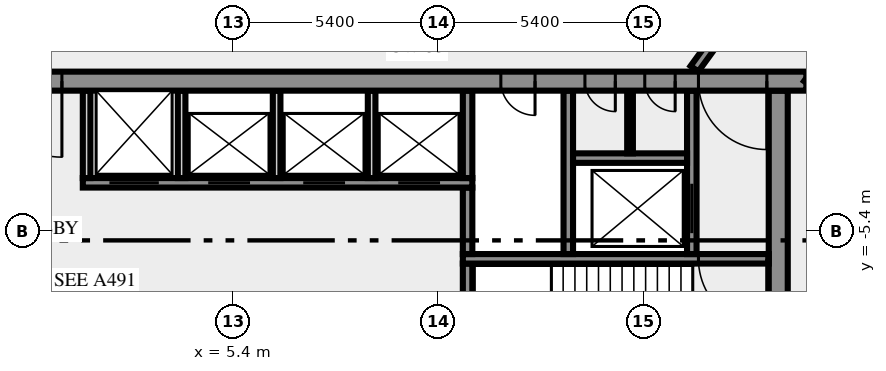
"""IFC4 building model, lengths in metres.
Left out: names, types, materials, properties, quantities, classifications, styles, units other than length and angle.
Written with IfcOpenShell. Run it as: python <this file> out.ifc"""

import sys

from ifc_helpers import new_model, si_unit, direction, frame, frame_2d, origin, place, context, subcontext, project, spatial, rectangle, extrude, element, fill, save


model = new_model("IFC4")
c1 = context("Model", 3, precision=1e-05, world=origin(), true_north=direction((0.0, 1.0)))
c2 = subcontext(c1, "Body", "Model", "MODEL_VIEW")
j1 = project(units=[si_unit("LENGTHUNIT", "METRE"), si_unit("PLANEANGLEUNIT", "RADIAN")], contexts=[c1])
p1 = place(None, origin())
s1 = spatial("IfcSite", under=j1, at=p1, CompositionType="ELEMENT")
p2 = place(p1, origin())
s2 = spatial("IfcBuilding", under=s1, at=p2, CompositionType="ELEMENT")
p3 = place(p2, frame((0.0, 0.0, 198.0)))
s3 = spatial("IfcBuildingStorey", under=s2, at=p3, CompositionType="ELEMENT", Elevation=198.0)
p4 = place(p3, frame((19.75, -10.5, 0.0), z_axis=(0.0, 0.0, 1.0), x_axis=(0.0, 1.0, 0.0)))
e1 = element("IfcWall", 1, at=p4, inside=s3, PredefinedType="SHEAR", context=c2, shape_type="SweptSolid", body=[
    extrude(rectangle(XDim=8.8, YDim=0.5, at=frame_2d((4.4, 0.0))), origin(), (0.0, 0.0, 1.0), 3.65),
])
p5 = place(p3, frame((11.575, -7.25, 0.0), z_axis=(0.0, 0.0, 1.0), x_axis=(0.0, 1.0, 0.0)))
e2 = element("IfcWall", 2, at=p5, inside=s3, PredefinedType="SHEAR", context=c2, shape_type="SweptSolid", body=[
    extrude(rectangle(XDim=1.0, YDim=0.25, at=frame_2d((0.5, 0.0))), origin(), (0.0, 0.0, 1.0), 3.65),
])
p6 = place(p3, frame((19.5, -6.125, 0.0), z_axis=(0.0, 0.0, 1.0), x_axis=(-1.0, 0.0, 0.0)))
e3 = element("IfcWall", 3, at=p6, inside=s3, PredefinedType="SHEAR", context=c2, shape_type="SweptSolid", body=[
    extrude(rectangle(XDim=8.05, YDim=0.25, at=frame_2d((4.025, 0.0))), origin(), (0.0, 0.0, 1.0), 3.65),
])
p7 = place(p6, frame((0.05, 0.0, 0.0)))
e4 = element("IfcOpeningElement", 4, at=p7, cuts=e3, PredefinedType="OPENING", context=c2, shape_type="SweptSolid", body=[
    extrude(rectangle(XDim=1.8, YDim=2.1, at=frame_2d((0.9, 1.05))), frame((0.0, 0.135, 0.0), z_axis=(0.0, -1.0, 0.0), x_axis=(1.0, 0.0, 0.0)), (0.0, 0.0, 1.0), 0.27),
])
p8 = place(p3, frame((11.575, -6.0, 0.0), z_axis=(0.0, 0.0, 1.0), x_axis=(0.0, 1.0, 0.0)))
e5 = element("IfcWall", 5, at=p8, inside=s3, PredefinedType="SHEAR", context=c2, shape_type="SweptSolid", body=[
    extrude(rectangle(XDim=1.75, YDim=0.25, at=frame_2d((0.875, 0.0))), origin(), (0.0, 0.0, 1.0), 3.65),
])
p9 = place(p3, frame((14.225, -6.0, 0.0), z_axis=(0.0, 0.0, 1.0), x_axis=(0.0, 1.0, 0.0)))
e6 = element("IfcWall", 6, at=p9, inside=s3, PredefinedType="SHEAR", context=c2, shape_type="SweptSolid", body=[
    extrude(rectangle(XDim=4.3, YDim=0.25, at=frame_2d((2.15, 0.0))), origin(), (0.0, 0.0, 1.0), 3.65),
])
p10 = place(p3, frame((17.475, -6.0, 0.0), z_axis=(0.0, 0.0, 1.0), x_axis=(0.0, 1.0, 0.0)))
e7 = element("IfcWall", 7, at=p10, inside=s3, PredefinedType="SHEAR", context=c2, shape_type="SweptSolid", body=[
    extrude(rectangle(XDim=4.3, YDim=0.25, at=frame_2d((2.15, 0.0))), origin(), (0.0, 0.0, 1.0), 3.65),
])
p11 = place(p10, frame((0.55, 0.0, 0.0)))
e8 = element("IfcOpeningElement", 8, at=p11, cuts=e7, PredefinedType="OPENING", context=c2, shape_type="SweptSolid", body=[
    extrude(rectangle(XDim=1.3, YDim=2.1, at=frame_2d((0.65, 1.05))), frame((0.0, 0.135, 0.0), z_axis=(0.0, -1.0, 0.0), x_axis=(1.0, 0.0, 0.0)), (0.0, 0.0, 1.0), 0.27),
])
p12 = place(p3, frame((1.45, -4.125, 0.0), z_axis=(0.0, 0.0, 1.0), x_axis=(1.0, 0.0, 0.0)))
e9 = element("IfcWall", 9, at=p12, inside=s3, PredefinedType="SHEAR", context=c2, shape_type="SweptSolid", body=[
    extrude(rectangle(XDim=10.25, YDim=0.25, at=frame_2d((5.125, 0.0))), origin(), (0.0, 0.0, 1.0), 3.65),
])
p13 = place(p12, frame((0.7, 0.0, 0.0)))
e10 = element("IfcOpeningElement", 10, at=p13, cuts=e9, PredefinedType="OPENING", context=c2, shape_type="SweptSolid", body=[
    extrude(rectangle(XDim=1.3, YDim=2.1, at=frame_2d((0.65, 1.05))), frame((0.0, 0.135, 0.0), z_axis=(0.0, -1.0, 0.0), x_axis=(1.0, 0.0, 0.0)), (0.0, 0.0, 1.0), 0.27),
])
p14 = place(p12, frame((3.3, 0.0, 0.0)))
e11 = element("IfcOpeningElement", 11, at=p14, cuts=e9, PredefinedType="OPENING", context=c2, shape_type="SweptSolid", body=[
    extrude(rectangle(XDim=1.1, YDim=2.1, at=frame_2d((0.55, 1.05))), frame((0.0, 0.135, 0.0), z_axis=(0.0, -1.0, 0.0), x_axis=(1.0, 0.0, 0.0)), (0.0, 0.0, 1.0), 0.27),
])
p15 = place(p12, frame((5.8, 0.0, 0.0)))
e12 = element("IfcOpeningElement", 12, at=p15, cuts=e9, PredefinedType="OPENING", context=c2, shape_type="SweptSolid", body=[
    extrude(rectangle(XDim=1.1, YDim=2.1, at=frame_2d((0.55, 1.05))), frame((0.0, 0.135, 0.0), z_axis=(0.0, -1.0, 0.0), x_axis=(1.0, 0.0, 0.0)), (0.0, 0.0, 1.0), 0.27),
])
p16 = place(p12, frame((8.3, 0.0, 0.0)))
e13 = element("IfcOpeningElement", 13, at=p16, cuts=e9, PredefinedType="OPENING", context=c2, shape_type="SweptSolid", body=[
    extrude(rectangle(XDim=1.1, YDim=2.1, at=frame_2d((0.55, 1.05))), frame((0.0, 0.135, 0.0), z_axis=(0.0, -1.0, 0.0), x_axis=(1.0, 0.0, 0.0)), (0.0, 0.0, 1.0), 0.27),
])
for number, where, z_axis, x_axis in (
    (14, (1.55, -4.0, 0.0), (0.0, 0.0, 1.0), (0.0, 1.0, 0.0)),
    (15, (4.05, -4.0, 0.0), (0.0, 0.0, 1.0), (0.0, 1.0, 0.0)),
    (16, (6.55, -4.0, 0.0), (0.0, 0.0, 1.0), (0.0, 1.0, 0.0)),
    (17, (9.05, -4.0, 0.0), (0.0, 0.0, 1.0), (0.0, 1.0, 0.0)),
):
    element("IfcWall", number, at=place(p3, frame(where, z_axis=z_axis, x_axis=x_axis)), inside=s3, PredefinedType="SOLIDWALL", context=c2, shape_type="SweptSolid", body=[
        extrude(rectangle(XDim=2.3, YDim=0.2, at=frame_2d((1.15, 0.0))), origin(), (0.0, 0.0, 1.0), 3.65),
    ])
p17 = place(p3, frame((11.575, -4.0, 0.0), z_axis=(0.0, 0.0, 1.0), x_axis=(0.0, 1.0, 0.0)))
e18 = element("IfcWall", 18, at=p17, inside=s3, PredefinedType="SHEAR", context=c2, shape_type="SweptSolid", body=[
    extrude(rectangle(XDim=2.3, YDim=0.25, at=frame_2d((1.15, 0.0))), origin(), (0.0, 0.0, 1.0), 3.65),
])
p18 = place(p3, frame((14.35, -3.475, 0.0), z_axis=(0.0, 0.0, 1.0), x_axis=(1.0, 0.0, 0.0)))
e19 = element("IfcWall", 19, at=p18, inside=s3, PredefinedType="SHEAR", context=c2, shape_type="SweptSolid", body=[
    extrude(rectangle(XDim=3.0, YDim=0.25, at=frame_2d((1.5, 0.0))), origin(), (0.0, 0.0, 1.0), 3.65),
])
p19 = place(p3, frame((15.85, -3.35, 0.0), z_axis=(0.0, 0.0, 1.0), x_axis=(0.0, 1.0, 0.0)))
e20 = element("IfcWall", 20, at=p19, inside=s3, PredefinedType="PARTITIONING", context=c2, shape_type="SweptSolid", body=[
    extrude(rectangle(XDim=1.65, YDim=0.15, at=frame_2d((0.825, 0.0))), origin(), (0.0, 0.0, 1.0), 3.65),
])
p20 = place(p3, frame((20.49, -1.45, 0.0), z_axis=(0.0, 0.0, 1.0), x_axis=(-1.0, 0.0, 0.0)))
e21 = element("IfcWall", 21, at=p20, inside=s3, PredefinedType="SHEAR", context=c2, shape_type="SweptSolid", body=[
    extrude(rectangle(XDim=40.98, YDim=0.5, at=frame_2d((20.49, 0.0))), origin(), (0.0, 0.0, 1.0), 3.65),
])
p21 = place(p20, frame((38.14, 0.0, 0.0)))
e22 = element("IfcOpeningElement", 22, at=p21, cuts=e21, PredefinedType="OPENING", context=c2, shape_type="SweptSolid", body=[
    extrude(rectangle(XDim=1.8, YDim=2.1, at=frame_2d((0.9, 1.05))), frame((0.0, 0.26, 0.0), z_axis=(0.0, -1.0, 0.0), x_axis=(1.0, 0.0, 0.0)), (0.0, 0.0, 1.0), 0.52),
])
p22 = place(p20, frame((35.89, 0.0, 0.0)))
e23 = element("IfcOpeningElement", 23, at=p22, cuts=e21, PredefinedType="OPENING", context=c2, shape_type="SweptSolid", body=[
    extrude(rectangle(XDim=0.9, YDim=2.1, at=frame_2d((0.45, 1.05))), frame((0.0, 0.26, 0.0), z_axis=(0.0, -1.0, 0.0), x_axis=(1.0, 0.0, 0.0)), (0.0, 0.0, 1.0), 0.52),
])
p23 = place(p20, frame((32.94, 0.0, 0.0)))
e24 = element("IfcOpeningElement", 24, at=p23, cuts=e21, PredefinedType="OPENING", context=c2, shape_type="SweptSolid", body=[
    extrude(rectangle(XDim=0.9, YDim=2.1, at=frame_2d((0.45, 1.05))), frame((0.0, 0.26, 0.0), z_axis=(0.0, -1.0, 0.0), x_axis=(1.0, 0.0, 0.0)), (0.0, 0.0, 1.0), 0.52),
])
p24 = place(p20, frame((30.302, 0.0, 0.0)))
e25 = element("IfcOpeningElement", 25, at=p24, cuts=e21, PredefinedType="OPENING", context=c2, shape_type="SweptSolid", body=[
    extrude(rectangle(XDim=0.9, YDim=2.1, at=frame_2d((0.45, 1.05))), frame((0.0, 0.26, 0.0), z_axis=(0.0, -1.0, 0.0), x_axis=(1.0, 0.0, 0.0)), (0.0, 0.0, 1.0), 0.52),
])
p25 = place(p20, frame((26.577, 0.0, 0.0)))
e26 = element("IfcOpeningElement", 26, at=p25, cuts=e21, PredefinedType="OPENING", context=c2, shape_type="SweptSolid", body=[
    extrude(rectangle(XDim=0.9, YDim=2.1, at=frame_2d((0.45, 1.05))), frame((0.0, 0.26, 0.0), z_axis=(0.0, -1.0, 0.0), x_axis=(1.0, 0.0, 0.0)), (0.0, 0.0, 1.0), 0.52),
])
p26 = place(p20, frame((19.59, 0.0, 0.0)))
e27 = element("IfcOpeningElement", 27, at=p26, cuts=e21, PredefinedType="OPENING", context=c2, shape_type="SweptSolid", body=[
    extrude(rectangle(XDim=2.0, YDim=2.1, at=frame_2d((1.0, 1.05))), frame((0.0, 0.26, 0.0), z_axis=(0.0, -1.0, 0.0), x_axis=(1.0, 0.0, 0.0)), (0.0, 0.0, 1.0), 0.52),
])
p27 = place(p20, frame((7.14, 0.0, 0.0)))
e28 = element("IfcOpeningElement", 28, at=p27, cuts=e21, PredefinedType="OPENING", context=c2, shape_type="SweptSolid", body=[
    extrude(rectangle(XDim=0.9, YDim=2.1, at=frame_2d((0.45, 1.05))), frame((0.0, 0.26, 0.0), z_axis=(0.0, -1.0, 0.0), x_axis=(1.0, 0.0, 0.0)), (0.0, 0.0, 1.0), 0.52),
])
p28 = place(p20, frame((5.028, 0.0, 0.0)))
e29 = element("IfcOpeningElement", 29, at=p28, cuts=e21, PredefinedType="OPENING", context=c2, shape_type="SweptSolid", body=[
    extrude(rectangle(XDim=0.8, YDim=2.1, at=frame_2d((0.4, 1.05))), frame((0.0, 0.26, 0.0), z_axis=(0.0, -1.0, 0.0), x_axis=(1.0, 0.0, 0.0)), (0.0, 0.0, 1.0), 0.52),
])
p29 = place(p20, frame((3.452, 0.0, 0.0)))
e30 = element("IfcOpeningElement", 30, at=p29, cuts=e21, PredefinedType="OPENING", context=c2, shape_type="SweptSolid", body=[
    extrude(rectangle(XDim=0.8, YDim=2.1, at=frame_2d((0.4, 1.05))), frame((0.0, 0.26, 0.0), z_axis=(0.0, -1.0, 0.0), x_axis=(1.0, 0.0, 0.0)), (0.0, 0.0, 1.0), 0.52),
])
p30 = place(p20, frame((1.04, 0.0, 0.0)))
e31 = element("IfcOpeningElement", 31, at=p30, cuts=e21, PredefinedType="OPENING", context=c2, shape_type="SweptSolid", body=[
    extrude(rectangle(XDim=1.8, YDim=2.1, at=frame_2d((0.9, 1.05))), frame((0.0, 0.26, 0.0), z_axis=(0.0, -1.0, 0.0), x_axis=(1.0, 0.0, 0.0)), (0.0, 0.0, 1.0), 0.52),
])
p31 = place(p3, frame((17.545, -1.125, 0.0), z_axis=(0.0, 0.0, 1.0), x_axis=(0.587796810203, 0.809008596935, 0.0)))
e32 = element("IfcWall", 32, at=p31, inside=s3, PredefinedType="SOLIDWALL", context=c2, shape_type="SweptSolid", body=[
    extrude(rectangle(XDim=12.703, YDim=0.25, at=frame_2d((6.352, 0.0))), origin(), (0.0, 0.0, 1.0), 3.65),
])
p32 = place(p31, frame((3.441, 0.0, 0.0)))
e33 = element("IfcOpeningElement", 33, at=p32, cuts=e32, PredefinedType="OPENING", context=c2, shape_type="SweptSolid", body=[
    extrude(rectangle(XDim=0.9, YDim=2.1, at=frame_2d((0.45, 1.05))), frame((0.0, 0.135, 0.0), z_axis=(0.0, -1.0, 0.0), x_axis=(1.0, 0.0, 0.0)), (0.0, 0.0, 1.0), 0.27),
])
p33 = place(p3, frame((27.009, 7.392, 0.0), z_axis=(0.0, 0.0, 1.0), x_axis=(-0.587776457057, -0.809023384414, 0.0)))
e34 = element("IfcWall", 34, at=p33, inside=s3, PredefinedType="SOLIDWALL", context=c2, shape_type="SweptSolid", body=[
    extrude(rectangle(XDim=11.021, YDim=0.25, at=frame_2d((5.51, 0.0))), origin(), (0.0, 0.0, 1.0), 3.65),
])
p34 = place(p33, frame((9.588, 0.0, 0.0)))
e35 = element("IfcOpeningElement", 35, at=p34, cuts=e34, PredefinedType="OPENING", context=c2, shape_type="SweptSolid", body=[
    extrude(rectangle(XDim=0.9, YDim=2.1, at=frame_2d((0.45, 1.05))), frame((0.0, 0.135, 0.0), z_axis=(0.0, -1.0, 0.0), x_axis=(1.0, 0.0, 0.0)), (0.0, 0.0, 1.0), 0.27),
])
p35 = place(p7, origin())
e36 = element("IfcDoor", 36, at=p35, inside=s3, OperationType="DOUBLE_DOOR_SINGLE_SWING", PredefinedType="DOOR", context=c2, shape_type="SweptSolid", body=[
    extrude(rectangle(XDim=1.8, YDim=2.1, at=frame_2d((0.9, 1.05))), frame((0.0, 0.025, 0.0), z_axis=(0.0, -1.0, 0.0), x_axis=(1.0, 0.0, 0.0)), (0.0, 0.0, 1.0), 0.05),
])
fill(e4, e36)
p36 = place(p11, origin())
e37 = element("IfcDoor", 37, at=p36, inside=s3, OperationType="DOUBLE_DOOR_SLIDING", PredefinedType="DOOR", context=c2, shape_type="SweptSolid", body=[
    extrude(rectangle(XDim=1.3, YDim=2.1, at=frame_2d((0.65, 1.05))), frame((0.0, 0.025, 0.0), z_axis=(0.0, -1.0, 0.0), x_axis=(1.0, 0.0, 0.0)), (0.0, 0.0, 1.0), 0.05),
])
fill(e8, e37)
p37 = place(p13, origin())
e38 = element("IfcDoor", 38, at=p37, inside=s3, OperationType="DOUBLE_DOOR_SLIDING", PredefinedType="DOOR", context=c2, shape_type="SweptSolid", body=[
    extrude(rectangle(XDim=1.3, YDim=2.1, at=frame_2d((0.65, 1.05))), frame((0.0, 0.025, 0.0), z_axis=(0.0, -1.0, 0.0), x_axis=(1.0, 0.0, 0.0)), (0.0, 0.0, 1.0), 0.05),
])
fill(e10, e38)
p38 = place(p14, origin())
e39 = element("IfcDoor", 39, at=p38, inside=s3, OperationType="DOUBLE_DOOR_SLIDING", PredefinedType="DOOR", context=c2, shape_type="SweptSolid", body=[
    extrude(rectangle(XDim=1.1, YDim=2.1, at=frame_2d((0.55, 1.05))), frame((0.0, 0.025, 0.0), z_axis=(0.0, -1.0, 0.0), x_axis=(1.0, 0.0, 0.0)), (0.0, 0.0, 1.0), 0.05),
])
fill(e11, e39)
p39 = place(p15, origin())
e40 = element("IfcDoor", 40, at=p39, inside=s3, OperationType="DOUBLE_DOOR_SLIDING", PredefinedType="DOOR", context=c2, shape_type="SweptSolid", body=[
    extrude(rectangle(XDim=1.1, YDim=2.1, at=frame_2d((0.55, 1.05))), frame((0.0, 0.025, 0.0), z_axis=(0.0, -1.0, 0.0), x_axis=(1.0, 0.0, 0.0)), (0.0, 0.0, 1.0), 0.05),
])
fill(e12, e40)
p40 = place(p16, origin())
e41 = element("IfcDoor", 41, at=p40, inside=s3, OperationType="DOUBLE_DOOR_SLIDING", PredefinedType="DOOR", context=c2, shape_type="SweptSolid", body=[
    extrude(rectangle(XDim=1.1, YDim=2.1, at=frame_2d((0.55, 1.05))), frame((0.0, 0.025, 0.0), z_axis=(0.0, -1.0, 0.0), x_axis=(1.0, 0.0, 0.0)), (0.0, 0.0, 1.0), 0.05),
])
fill(e13, e41)
p41 = place(p26, origin())
e42 = element("IfcDoor", 42, at=p41, inside=s3, OperationType="DOUBLE_DOOR_SINGLE_SWING", PredefinedType="DOOR", context=c2, shape_type="SweptSolid", body=[
    extrude(rectangle(XDim=2.0, YDim=2.1, at=frame_2d((1.0, 1.05))), frame((0.0, 0.025, 0.0), z_axis=(0.0, -1.0, 0.0), x_axis=(1.0, 0.0, 0.0)), (0.0, 0.0, 1.0), 0.05),
])
fill(e27, e42)
p42 = place(p27, origin())
e43 = element("IfcDoor", 43, at=p42, inside=s3, OperationType="SINGLE_SWING_LEFT", PredefinedType="DOOR", context=c2, shape_type="SweptSolid", body=[
    extrude(rectangle(XDim=0.9, YDim=2.1, at=frame_2d((0.45, 1.05))), frame((0.0, 0.025, 0.0), z_axis=(0.0, -1.0, 0.0), x_axis=(1.0, 0.0, 0.0)), (0.0, 0.0, 1.0), 0.05),
])
fill(e28, e43)
p43 = place(p28, origin())
e44 = element("IfcDoor", 44, at=p43, inside=s3, OperationType="SINGLE_SWING_LEFT", PredefinedType="DOOR", context=c2, shape_type="SweptSolid", body=[
    extrude(rectangle(XDim=0.8, YDim=2.1, at=frame_2d((0.4, 1.05))), frame((0.0, 0.025, 0.0), z_axis=(0.0, -1.0, 0.0), x_axis=(1.0, 0.0, 0.0)), (0.0, 0.0, 1.0), 0.05),
])
fill(e29, e44)
p44 = place(p29, origin())
e45 = element("IfcDoor", 45, at=p44, inside=s3, OperationType="SINGLE_SWING_LEFT", PredefinedType="DOOR", context=c2, shape_type="SweptSolid", body=[
    extrude(rectangle(XDim=0.8, YDim=2.1, at=frame_2d((0.4, 1.05))), frame((0.0, 0.025, 0.0), z_axis=(0.0, -1.0, 0.0), x_axis=(1.0, 0.0, 0.0)), (0.0, 0.0, 1.0), 0.05),
])
fill(e30, e45)
p45 = place(p30, origin())
e46 = element("IfcDoor", 46, at=p45, inside=s3, OperationType="DOUBLE_DOOR_SINGLE_SWING", PredefinedType="DOOR", context=c2, shape_type="SweptSolid", body=[
    extrude(rectangle(XDim=1.8, YDim=2.1, at=frame_2d((0.9, 1.05))), frame((0.0, 0.025, 0.0), z_axis=(0.0, -1.0, 0.0), x_axis=(1.0, 0.0, 0.0)), (0.0, 0.0, 1.0), 0.05),
])
fill(e31, e46)
save(model, sys.argv[1])
